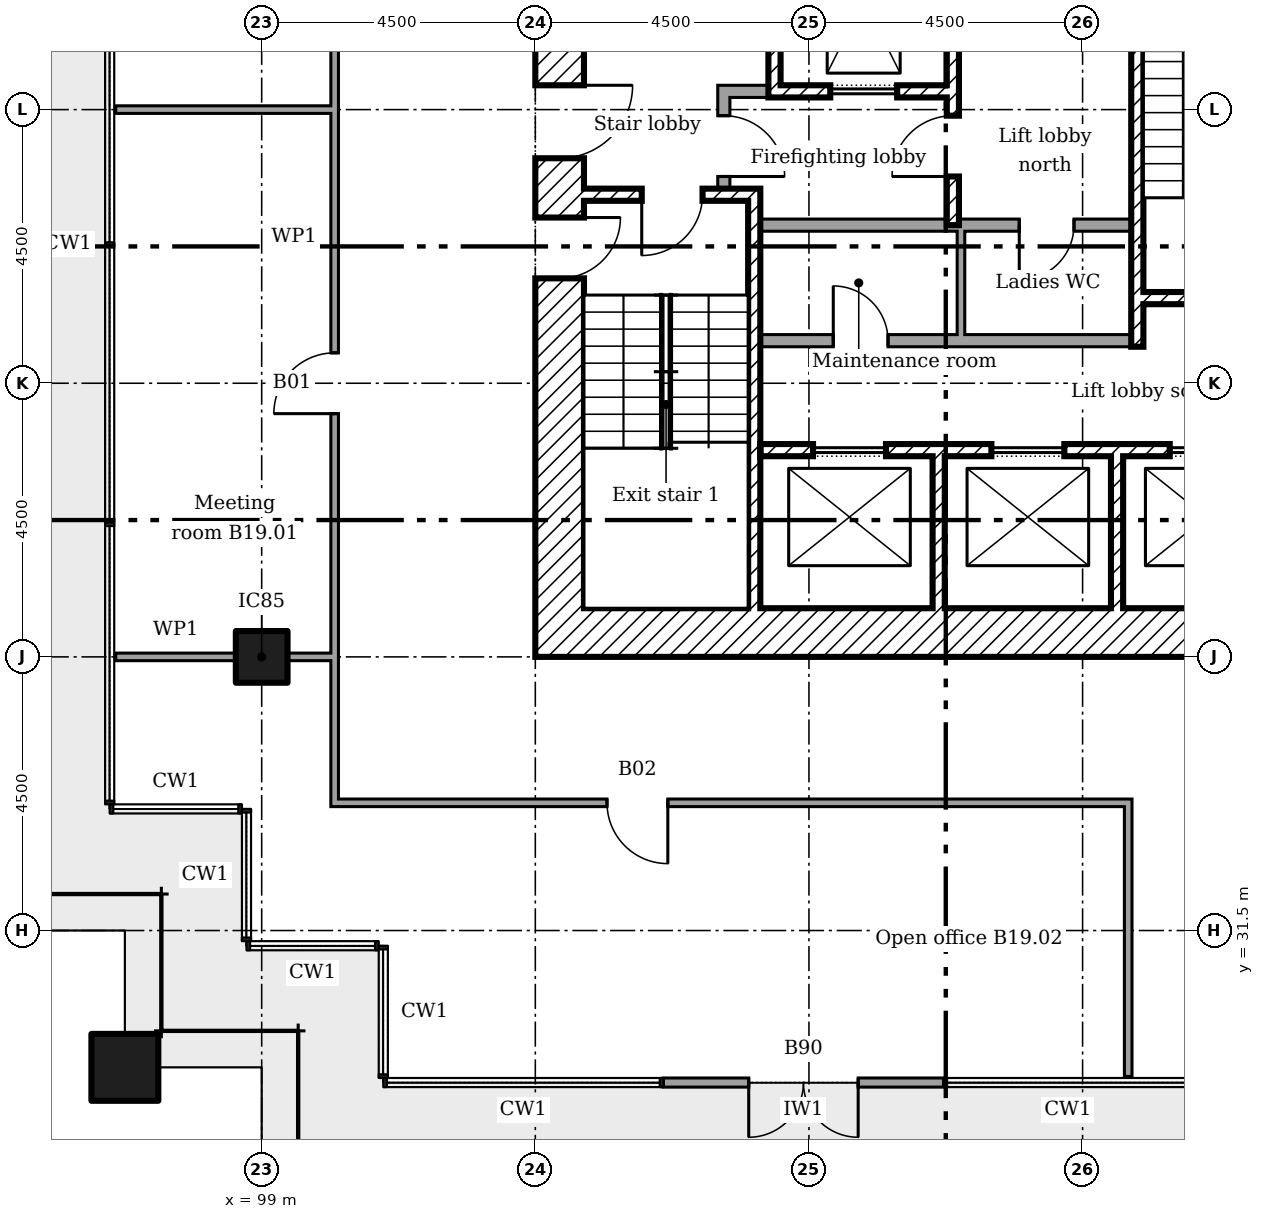
"""IFC4 building model, lengths in metres.
Left out: names, types, materials, properties, quantities, classifications, styles, units other than length and angle.
Written with IfcOpenShell. Run it as: python <this file> out.ifc"""

import sys

from ifc_helpers import new_model, si_unit, direction, frame, frame_2d, origin, origin_2d, place, context, subcontext, project, spatial, rectangle, extrude, element, fill, save


model = new_model("IFC4")
c1 = context("Model", 3, precision=1e-05, world=origin(), true_north=direction((0.0, 1.0)))
c2 = subcontext(c1, "Body", "Model", "MODEL_VIEW")
j1 = project(units=[si_unit("LENGTHUNIT", "METRE"), si_unit("PLANEANGLEUNIT", "RADIAN")], contexts=[c1])
p1 = place(None, origin())
s1 = spatial("IfcSite", under=j1, at=p1, CompositionType="ELEMENT")
p2 = place(p1, origin())
s2 = spatial("IfcBuilding", under=s1, at=p2, CompositionType="ELEMENT")
p3 = place(p2, frame((0.0, 0.0, 79.8)))
s3 = spatial("IfcBuildingStorey", under=s2, at=p3, CompositionType="ELEMENT", Elevation=79.8)
p4 = place(p3, frame((96.75, 29.25, 0.0)))
e1 = element("IfcColumn", 1, at=p4, inside=s3, PredefinedType="COLUMN", context=c2, shape_type="SweptSolid", body=[
    extrude(rectangle(XDim=1.1, YDim=1.1, at=origin_2d()), origin(), (0.0, 0.0, 1.0), 3.6),
])
p5 = place(p3, frame((99.0, 36.0, 0.0)))
e2 = element("IfcColumn", 2, at=p5, inside=s3, PredefinedType="COLUMN", context=c2, shape_type="SweptSolid", body=[
    extrude(rectangle(XDim=0.85, YDim=0.85, at=origin_2d()), origin(), (0.0, 0.0, 1.0), 3.6),
])
p6 = place(p3, frame((105.606, 29.0, 0.0)))
e3 = element("IfcWall", 3, at=p6, inside=s3, PredefinedType="SOLIDWALL", context=c2, shape_type="SweptSolid", body=[
    extrude(rectangle(XDim=4.606, YDim=0.15, at=frame_2d((2.303, 0.0))), origin(), (0.0, 0.0, 1.0), 3.45),
])
p7 = place(p6, frame((1.403, 0.0, 0.0)))
e4 = element("IfcOpeningElement", 4, at=p7, cuts=e3, PredefinedType="OPENING", context=c2, shape_type="SweptSolid", body=[
    extrude(rectangle(XDim=1.8, YDim=2.4, at=frame_2d((0.9, 1.2))), frame((0.0, 0.085, 0.0), z_axis=(0.0, -1.0, 0.0), x_axis=(1.0, 0.0, 0.0)), (0.0, 0.0, 1.0), 0.17),
])
p8 = place(p3, frame((104.3, 36.4, 0.0)))
e5 = element("IfcWall", 5, at=p8, inside=s3, PredefinedType="SHEAR", context=c2, shape_type="SweptSolid", body=[
    extrude(rectangle(XDim=11.9, YDim=0.8, at=frame_2d((5.95, 0.0))), origin(), (0.0, 0.0, 1.0), 3.35),
])
p9 = place(p3, frame((103.9, 36.0, 0.0), z_axis=(0.0, 0.0, 1.0), x_axis=(0.0, 1.0, 0.0)))
e6 = element("IfcWall", 6, at=p9, inside=s3, PredefinedType="SHEAR", context=c2, shape_type="SweptSolid", body=[
    extrude(rectangle(XDim=13.5, YDim=0.8, at=frame_2d((6.75, 0.0))), origin(), (0.0, 0.0, 1.0), 3.35),
])
p10 = place(p9, frame((8.2, 0.0, 0.0)))
e7 = element("IfcOpeningElement", 7, at=p10, cuts=e6, PredefinedType="OPENING", context=c2, shape_type="SweptSolid", body=[
    extrude(rectangle(XDim=1.2, YDim=2.1, at=frame_2d((0.6, 1.05))), frame((0.0, 0.41, 0.0), z_axis=(0.0, -1.0, 0.0), x_axis=(1.0, 0.0, 0.0)), (0.0, 0.0, 1.0), 0.82),
])
p11 = place(p9, frame((6.225, 0.0, 0.0)))
e8 = element("IfcOpeningElement", 8, at=p11, cuts=e6, PredefinedType="OPENING", context=c2, shape_type="SweptSolid", body=[
    extrude(rectangle(XDim=1.0, YDim=2.1, at=frame_2d((0.5, 1.05))), frame((0.0, 0.41, 0.0), z_axis=(0.0, -1.0, 0.0), x_axis=(1.0, 0.0, 0.0)), (0.0, 0.0, 1.0), 0.82),
])
p12 = place(p3, frame((107.433, 48.7, 0.0), z_axis=(0.0, 0.0, 1.0), x_axis=(0.0, -1.0, 0.0)))
e9 = element("IfcWall", 9, at=p12, inside=s3, PredefinedType="SHEAR", context=c2, shape_type="SweptSolid", body=[
    extrude(rectangle(XDim=3.5, YDim=0.2, at=frame_2d((1.75, 0.0))), origin(), (0.0, 0.0, 1.0), 3.35),
])
p13 = place(p3, frame((110.367, 48.7, 0.0), z_axis=(0.0, 0.0, 1.0), x_axis=(0.0, -1.0, 0.0)))
e10 = element("IfcWall", 10, at=p13, inside=s3, PredefinedType="SHEAR", context=c2, shape_type="SweptSolid", body=[
    extrude(rectangle(XDim=5.6, YDim=0.2, at=frame_2d((2.8, 0.0))), origin(), (0.0, 0.0, 1.0), 3.35),
])
p14 = place(p13, frame((3.8, 0.0, 0.0)))
e11 = element("IfcOpeningElement", 11, at=p14, cuts=e10, PredefinedType="OPENING", context=c2, shape_type="SweptSolid", body=[
    extrude(rectangle(XDim=1.0, YDim=2.1, at=frame_2d((0.5, 1.05))), frame((0.0, 0.11, 0.0), z_axis=(0.0, -1.0, 0.0), x_axis=(1.0, 0.0, 0.0)), (0.0, 0.0, 1.0), 0.22),
])
for number, where, z_axis, x_axis in (
    (12, (110.133, 36.8, 0.0), (0.0, 0.0, 1.0), (0.0, 1.0, 0.0)),
    (13, (113.067, 36.8, 0.0), (0.0, 0.0, 1.0), (0.0, 1.0, 0.0)),
):
    element("IfcWall", number, at=place(p3, frame(where, z_axis=z_axis, x_axis=x_axis)), inside=s3, PredefinedType="SHEAR", context=c2, shape_type="SweptSolid", body=[
        extrude(rectangle(XDim=2.5, YDim=0.2, at=frame_2d((1.25, 0.0))), origin(), (0.0, 0.0, 1.0), 3.35),
    ])
p15 = place(p3, frame((106.5, 45.3, 0.0)))
e14 = element("IfcWall", 14, at=p15, inside=s3, PredefinedType="PARTITIONING", context=c2, shape_type="SweptSolid", body=[
    extrude(rectangle(XDim=0.833, YDim=0.2, at=frame_2d((0.417, 0.0))), origin(), (0.0, 0.0, 1.0), 3.35),
])
p16 = place(p3, frame((106.6, 43.7, 0.0), z_axis=(0.0, 0.0, 1.0), x_axis=(0.0, 1.0, 0.0)))
e15 = element("IfcWall", 15, at=p16, inside=s3, PredefinedType="PARTITIONING", context=c2, shape_type="SweptSolid", body=[
    extrude(rectangle(XDim=1.5, YDim=0.2, at=frame_2d((0.75, 0.0))), origin(), (0.0, 0.0, 1.0), 3.35),
])
p17 = place(p16, frame((0.2, 0.0, 0.0)))
e16 = element("IfcOpeningElement", 16, at=p17, cuts=e15, PredefinedType="OPENING", context=c2, shape_type="SweptSolid", body=[
    extrude(rectangle(XDim=1.0, YDim=2.1, at=frame_2d((0.5, 1.05))), frame((0.0, 0.11, 0.0), z_axis=(0.0, -1.0, 0.0), x_axis=(1.0, 0.0, 0.0)), (0.0, 0.0, 1.0), 0.22),
])
p18 = place(p3, frame((107.533, 45.3, 0.0)))
e17 = element("IfcWall", 17, at=p18, inside=s3, PredefinedType="SHEAR", context=c2, shape_type="SweptSolid", body=[
    extrude(rectangle(XDim=2.733, YDim=0.2, at=frame_2d((1.367, 0.0))), origin(), (0.0, 0.0, 1.0), 3.35),
])
p19 = place(p18, frame((0.817, 0.0, 0.0)))
e18 = element("IfcOpeningElement", 18, at=p19, cuts=e17, PredefinedType="OPENING", context=c2, shape_type="SweptSolid", body=[
    extrude(rectangle(XDim=1.1, YDim=2.1, at=frame_2d((0.55, 1.05))), frame((0.0, 0.11, 0.0), z_axis=(0.0, -1.0, 0.0), x_axis=(1.0, 0.0, 0.0)), (0.0, 0.0, 1.0), 0.22),
])
p20 = place(p3, frame((107.2, 39.4, 0.0)))
e19 = element("IfcWall", 19, at=p20, inside=s3, PredefinedType="SHEAR", context=c2, shape_type="SweptSolid", body=[
    extrude(rectangle(XDim=9.0, YDim=0.2, at=frame_2d((4.5, 0.0))), origin(), (0.0, 0.0, 1.0), 3.35),
])
p21 = place(p20, frame((0.867, 0.0, 0.0)))
e20 = element("IfcOpeningElement", 20, at=p21, cuts=e19, PredefinedType="OPENING", context=c2, shape_type="SweptSolid", body=[
    extrude(rectangle(XDim=1.2, YDim=2.1, at=frame_2d((0.6, 1.05))), frame((0.0, 0.11, 0.0), z_axis=(0.0, -1.0, 0.0), x_axis=(1.0, 0.0, 0.0)), (0.0, 0.0, 1.0), 0.22),
])
p22 = place(p20, frame((3.8, 0.0, 0.0)))
e21 = element("IfcOpeningElement", 21, at=p22, cuts=e19, PredefinedType="OPENING", context=c2, shape_type="SweptSolid", body=[
    extrude(rectangle(XDim=1.2, YDim=2.1, at=frame_2d((0.6, 1.05))), frame((0.0, 0.11, 0.0), z_axis=(0.0, -1.0, 0.0), x_axis=(1.0, 0.0, 0.0)), (0.0, 0.0, 1.0), 0.22),
])
p23 = place(p20, frame((6.733, 0.0, 0.0)))
e22 = element("IfcOpeningElement", 22, at=p23, cuts=e19, PredefinedType="OPENING", context=c2, shape_type="SweptSolid", body=[
    extrude(rectangle(XDim=1.2, YDim=2.1, at=frame_2d((0.6, 1.05))), frame((0.0, 0.11, 0.0), z_axis=(0.0, -1.0, 0.0), x_axis=(1.0, 0.0, 0.0)), (0.0, 0.0, 1.0), 0.22),
])
p24 = place(p3, frame((107.1, 36.8, 0.0), z_axis=(0.0, 0.0, 1.0), x_axis=(0.0, 1.0, 0.0)))
e23 = element("IfcWall", 23, at=p24, inside=s3, PredefinedType="SHEAR", context=c2, shape_type="SweptSolid", body=[
    extrude(rectangle(XDim=6.9, YDim=0.2, at=frame_2d((3.45, 0.0))), origin(), (0.0, 0.0, 1.0), 3.35),
])
p25 = place(p3, frame((104.3, 43.6, 0.0)))
e24 = element("IfcWall", 24, at=p25, inside=s3, PredefinedType="SHEAR", context=c2, shape_type="SweptSolid", body=[
    extrude(rectangle(XDim=2.7, YDim=0.2, at=frame_2d((1.35, 0.0))), origin(), (0.0, 0.0, 1.0), 3.35),
])
p26 = place(p25, frame((0.95, 0.0, 0.0)))
e25 = element("IfcOpeningElement", 25, at=p26, cuts=e24, PredefinedType="OPENING", context=c2, shape_type="SweptSolid", body=[
    extrude(rectangle(XDim=1.0, YDim=2.1, at=frame_2d((0.5, 1.05))), frame((0.0, 0.11, 0.0), z_axis=(0.0, -1.0, 0.0), x_axis=(1.0, 0.0, 0.0)), (0.0, 0.0, 1.0), 0.22),
])
p27 = place(p3, frame((113.5, 41.9, 0.0)))
e26 = element("IfcWall", 26, at=p27, inside=s3, PredefinedType="SHEAR", context=c2, shape_type="SweptSolid", body=[
    extrude(rectangle(XDim=2.7, YDim=0.2, at=frame_2d((1.35, 0.0))), origin(), (0.0, 0.0, 1.0), 3.35),
])
p28 = place(p27, frame((0.75, 0.0, 0.0)))
e27 = element("IfcOpeningElement", 27, at=p28, cuts=e26, PredefinedType="OPENING", context=c2, shape_type="SweptSolid", body=[
    extrude(rectangle(XDim=1.0, YDim=2.1, at=frame_2d((0.5, 1.05))), frame((0.0, 0.11, 0.0), z_axis=(0.0, -1.0, 0.0), x_axis=(1.0, 0.0, 0.0)), (0.0, 0.0, 1.0), 0.22),
])
p29 = place(p3, frame((113.4, 41.1, 0.0), z_axis=(0.0, 0.0, 1.0), x_axis=(0.0, 1.0, 0.0)))
e28 = element("IfcWall", 28, at=p29, inside=s3, PredefinedType="SHEAR", context=c2, shape_type="SweptSolid", body=[
    extrude(rectangle(XDim=7.6, YDim=0.2, at=frame_2d((3.8, 0.0))), origin(), (0.0, 0.0, 1.0), 3.35),
])
p30 = place(p3, frame((107.2, 43.1, 0.0)))
e29 = element("IfcWall", 29, at=p30, inside=s3, PredefinedType="PARTITIONING", context=c2, shape_type="SweptSolid", body=[
    extrude(rectangle(XDim=6.1, YDim=0.2, at=frame_2d((3.05, 0.0))), origin(), (0.0, 0.0, 1.0), 3.35),
])
p31 = place(p30, frame((4.259, 0.0, 0.0)))
e30 = element("IfcOpeningElement", 30, at=p31, cuts=e29, PredefinedType="OPENING", context=c2, shape_type="SweptSolid", body=[
    extrude(rectangle(XDim=0.9, YDim=2.1, at=frame_2d((0.45, 1.05))), frame((0.0, 0.11, 0.0), z_axis=(0.0, -1.0, 0.0), x_axis=(1.0, 0.0, 0.0)), (0.0, 0.0, 1.0), 0.22),
])
p32 = place(p3, frame((107.2, 41.2, 0.0)))
e31 = element("IfcWall", 31, at=p32, inside=s3, PredefinedType="PARTITIONING", context=c2, shape_type="SweptSolid", body=[
    extrude(rectangle(XDim=6.1, YDim=0.2, at=frame_2d((3.05, 0.0))), origin(), (0.0, 0.0, 1.0), 3.35),
])
p33 = place(p32, frame((1.2, 0.0, 0.0)))
e32 = element("IfcOpeningElement", 32, at=p33, cuts=e31, PredefinedType="OPENING", context=c2, shape_type="SweptSolid", body=[
    extrude(rectangle(XDim=0.9, YDim=2.1, at=frame_2d((0.45, 1.05))), frame((0.0, 0.11, 0.0), z_axis=(0.0, -1.0, 0.0), x_axis=(1.0, 0.0, 0.0)), (0.0, 0.0, 1.0), 0.22),
])
p34 = place(p3, frame((110.5, 41.3, 0.0), z_axis=(0.0, 0.0, 1.0), x_axis=(0.0, 1.0, 0.0)))
e33 = element("IfcWall", 33, at=p34, inside=s3, PredefinedType="PARTITIONING", context=c2, shape_type="SweptSolid", body=[
    extrude(rectangle(XDim=1.7, YDim=0.125, at=frame_2d((0.85, 0.0))), origin(), (0.0, 0.0, 1.0), 3.35),
])
p35 = place(p3, frame((100.137, 33.6, 0.0)))
e34 = element("IfcWall", 34, at=p35, inside=s3, PredefinedType="PARTITIONING", context=c2, shape_type="SweptSolid", body=[
    extrude(rectangle(XDim=13.175, YDim=0.125, at=frame_2d((6.587, 0.0))), origin(), (0.0, 0.0, 1.0), 3.45),
])
p36 = place(p35, frame((4.542, 0.0, 0.0)))
e35 = element("IfcOpeningElement", 35, at=p36, cuts=e34, PredefinedType="OPENING", context=c2, shape_type="SweptSolid", body=[
    extrude(rectangle(XDim=1.0, YDim=2.1, at=frame_2d((0.5, 1.05))), frame((0.0, 0.073, 0.0), z_axis=(0.0, -1.0, 0.0), x_axis=(1.0, 0.0, 0.0)), (0.0, 0.0, 1.0), 0.145),
])
p37 = place(p3, frame((96.6, 36.0, 0.0)))
e36 = element("IfcWall", 36, at=p37, inside=s3, PredefinedType="PARTITIONING", context=c2, shape_type="SweptSolid", body=[
    extrude(rectangle(XDim=1.975, YDim=0.125, at=frame_2d((0.987, 0.0))), origin(), (0.0, 0.0, 1.0), 2.842),
])
p38 = place(p3, frame((99.425, 36.0, 0.0)))
e37 = element("IfcWall", 37, at=p38, inside=s3, PredefinedType="PARTITIONING", context=c2, shape_type="SweptSolid", body=[
    extrude(rectangle(XDim=0.775, YDim=0.125, at=frame_2d((0.387, 0.0))), origin(), (0.0, 0.0, 1.0), 2.842),
])
p39 = place(p3, frame((96.6, 45.0, 0.0)))
e38 = element("IfcWall", 38, at=p39, inside=s3, PredefinedType="PARTITIONING", context=c2, shape_type="SweptSolid", body=[
    extrude(rectangle(XDim=3.6, YDim=0.125, at=frame_2d((1.8, 0.0))), origin(), (0.0, 0.0, 1.0), 2.851),
])
p40 = place(p3, frame((100.2, 33.663, 0.0), z_axis=(0.0, 0.0, 1.0), x_axis=(0.0, 1.0, 0.0)))
e39 = element("IfcWall", 39, at=p40, inside=s3, PredefinedType="PARTITIONING", context=c2, shape_type="SweptSolid", body=[
    extrude(rectangle(XDim=18.475, YDim=0.125, at=frame_2d((9.237, 0.0))), origin(), (0.0, 0.0, 1.0), 3.45),
])
p41 = place(p40, frame((6.337, 0.0, 0.0)))
e40 = element("IfcOpeningElement", 40, at=p41, cuts=e39, PredefinedType="OPENING", context=c2, shape_type="SweptSolid", body=[
    extrude(rectangle(XDim=1.0, YDim=2.1, at=frame_2d((0.5, 1.05))), frame((0.0, 0.073, 0.0), z_axis=(0.0, -1.0, 0.0), x_axis=(1.0, 0.0, 0.0)), (0.0, 0.0, 1.0), 0.145),
])
p42 = place(p3, frame((113.25, 29.1, 0.0), z_axis=(0.0, 0.0, 1.0), x_axis=(0.0, 1.0, 0.0)))
e41 = element("IfcWall", 41, at=p42, inside=s3, PredefinedType="PARTITIONING", context=c2, shape_type="SweptSolid", body=[
    extrude(rectangle(XDim=4.438, YDim=0.125, at=frame_2d((2.219, 0.0))), origin(), (0.0, 0.0, 1.0), 3.45),
])
p43 = place(p7, frame((1.8, 0.0, 0.0), x_axis=(-1.0, 0.0, 0.0)))
e42 = element("IfcDoor", 42, at=p43, inside=s3, OperationType="DOUBLE_DOOR_DOUBLE_SWING", PredefinedType="NOTDEFINED", context=c2, shape_type="SweptSolid", body=[
    extrude(rectangle(XDim=1.8, YDim=2.4, at=frame_2d((0.9, 1.2))), frame((0.0, 0.025, 0.0), z_axis=(0.0, -1.0, 0.0), x_axis=(1.0, 0.0, 0.0)), (0.0, 0.0, 1.0), 0.05),
])
fill(e4, e42)
p44 = place(p10, frame((1.2, 0.0, 0.0), x_axis=(-1.0, 0.0, 0.0)))
e43 = element("IfcDoor", 43, at=p44, inside=s3, OperationType="SINGLE_SWING_RIGHT", PredefinedType="DOOR", context=c2, shape_type="SweptSolid", body=[
    extrude(rectangle(XDim=1.2, YDim=2.1, at=frame_2d((0.6, 1.05))), frame((0.0, 0.025, 0.0), z_axis=(0.0, -1.0, 0.0), x_axis=(1.0, 0.0, 0.0)), (0.0, 0.0, 1.0), 0.05),
])
fill(e7, e43)
p45 = place(p26, frame((1.0, 0.0, 0.0), x_axis=(-1.0, 0.0, 0.0)))
e44 = element("IfcDoor", 44, at=p45, inside=s3, OperationType="SINGLE_SWING_LEFT", PredefinedType="DOOR", context=c2, shape_type="SweptSolid", body=[
    extrude(rectangle(XDim=1.0, YDim=2.1, at=frame_2d((0.5, 1.05))), frame((0.0, 0.025, 0.0), z_axis=(0.0, -1.0, 0.0), x_axis=(1.0, 0.0, 0.0)), (0.0, 0.0, 1.0), 0.05),
])
fill(e25, e44)
p46 = place(p11, frame((1.0, 0.0, 0.0), x_axis=(-1.0, 0.0, 0.0)))
e45 = element("IfcDoor", 45, at=p46, inside=s3, OperationType="SINGLE_SWING_RIGHT", PredefinedType="DOOR", context=c2, shape_type="SweptSolid", body=[
    extrude(rectangle(XDim=1.0, YDim=2.1, at=frame_2d((0.5, 1.05))), frame((0.0, 0.025, 0.0), z_axis=(0.0, -1.0, 0.0), x_axis=(1.0, 0.0, 0.0)), (0.0, 0.0, 1.0), 0.05),
])
fill(e8, e45)
p47 = place(p14, frame((1.0, 0.0, 0.0), x_axis=(-1.0, 0.0, 0.0)))
e46 = element("IfcDoor", 46, at=p47, inside=s3, OperationType="SINGLE_SWING_RIGHT", PredefinedType="DOOR", context=c2, shape_type="SweptSolid", body=[
    extrude(rectangle(XDim=1.0, YDim=2.1, at=frame_2d((0.5, 1.05))), frame((0.0, 0.025, 0.0), z_axis=(0.0, -1.0, 0.0), x_axis=(1.0, 0.0, 0.0)), (0.0, 0.0, 1.0), 0.05),
])
fill(e11, e46)
p48 = place(p17, frame((1.0, 0.0, 0.0), x_axis=(-1.0, 0.0, 0.0)))
e47 = element("IfcDoor", 47, at=p48, inside=s3, OperationType="SINGLE_SWING_LEFT", PredefinedType="DOOR", context=c2, shape_type="SweptSolid", body=[
    extrude(rectangle(XDim=1.0, YDim=2.1, at=frame_2d((0.5, 1.05))), frame((0.0, 0.025, 0.0), z_axis=(0.0, -1.0, 0.0), x_axis=(1.0, 0.0, 0.0)), (0.0, 0.0, 1.0), 0.05),
])
fill(e16, e47)
p49 = place(p33, origin())
e48 = element("IfcDoor", 48, at=p49, inside=s3, OperationType="SINGLE_SWING_RIGHT", PredefinedType="DOOR", context=c2, shape_type="SweptSolid", body=[
    extrude(rectangle(XDim=0.9, YDim=2.1, at=frame_2d((0.45, 1.05))), frame((0.0, 0.025, 0.0), z_axis=(0.0, -1.0, 0.0), x_axis=(1.0, 0.0, 0.0)), (0.0, 0.0, 1.0), 0.05),
])
fill(e32, e48)
p50 = place(p31, frame((0.9, 0.0, 0.0), x_axis=(-1.0, 0.0, 0.0)))
e49 = element("IfcDoor", 49, at=p50, inside=s3, OperationType="SINGLE_SWING_LEFT", PredefinedType="DOOR", context=c2, shape_type="SweptSolid", body=[
    extrude(rectangle(XDim=0.9, YDim=2.1, at=frame_2d((0.45, 1.05))), frame((0.0, 0.025, 0.0), z_axis=(0.0, -1.0, 0.0), x_axis=(1.0, 0.0, 0.0)), (0.0, 0.0, 1.0), 0.05),
])
fill(e30, e49)
p51 = place(p19, origin())
e50 = element("IfcDoor", 50, at=p51, inside=s3, OperationType="SLIDING_TO_LEFT", PredefinedType="DOOR", context=c2, shape_type="SweptSolid", body=[
    extrude(rectangle(XDim=1.1, YDim=2.1, at=frame_2d((0.55, 1.05))), frame((0.0, 0.025, 0.0), z_axis=(0.0, -1.0, 0.0), x_axis=(1.0, 0.0, 0.0)), (0.0, 0.0, 1.0), 0.05),
])
fill(e18, e50)
p52 = place(p21, origin())
e51 = element("IfcDoor", 51, at=p52, inside=s3, OperationType="SLIDING_TO_LEFT", PredefinedType="DOOR", context=c2, shape_type="SweptSolid", body=[
    extrude(rectangle(XDim=1.2, YDim=2.1, at=frame_2d((0.6, 1.05))), frame((0.0, 0.025, 0.0), z_axis=(0.0, -1.0, 0.0), x_axis=(1.0, 0.0, 0.0)), (0.0, 0.0, 1.0), 0.05),
])
fill(e20, e51)
p53 = place(p22, origin())
e52 = element("IfcDoor", 52, at=p53, inside=s3, OperationType="SLIDING_TO_LEFT", PredefinedType="DOOR", context=c2, shape_type="SweptSolid", body=[
    extrude(rectangle(XDim=1.2, YDim=2.1, at=frame_2d((0.6, 1.05))), frame((0.0, 0.025, 0.0), z_axis=(0.0, -1.0, 0.0), x_axis=(1.0, 0.0, 0.0)), (0.0, 0.0, 1.0), 0.05),
])
fill(e21, e52)
p54 = place(p23, origin())
e53 = element("IfcDoor", 53, at=p54, inside=s3, OperationType="SLIDING_TO_LEFT", PredefinedType="DOOR", context=c2, shape_type="SweptSolid", body=[
    extrude(rectangle(XDim=1.2, YDim=2.1, at=frame_2d((0.6, 1.05))), frame((0.0, 0.025, 0.0), z_axis=(0.0, -1.0, 0.0), x_axis=(1.0, 0.0, 0.0)), (0.0, 0.0, 1.0), 0.05),
])
fill(e22, e53)
p55 = place(p41, origin())
e54 = element("IfcDoor", 54, at=p55, inside=s3, OperationType="SINGLE_SWING_RIGHT", PredefinedType="DOOR", context=c2, shape_type="SweptSolid", body=[
    extrude(rectangle(XDim=1.0, YDim=2.1, at=frame_2d((0.5, 1.05))), frame((0.0, 0.025, 0.0), z_axis=(0.0, -1.0, 0.0), x_axis=(1.0, 0.0, 0.0)), (0.0, 0.0, 1.0), 0.05),
])
fill(e40, e54)
p56 = place(p36, frame((1.0, 0.0, 0.0), x_axis=(-1.0, 0.0, 0.0)))
e55 = element("IfcDoor", 55, at=p56, inside=s3, OperationType="SINGLE_SWING_RIGHT", PredefinedType="DOOR", context=c2, shape_type="SweptSolid", body=[
    extrude(rectangle(XDim=1.0, YDim=2.1, at=frame_2d((0.5, 1.05))), frame((0.0, 0.025, 0.0), z_axis=(0.0, -1.0, 0.0), x_axis=(1.0, 0.0, 0.0)), (0.0, 0.0, 1.0), 0.05),
])
fill(e35, e55)
save(model, sys.argv[1])
